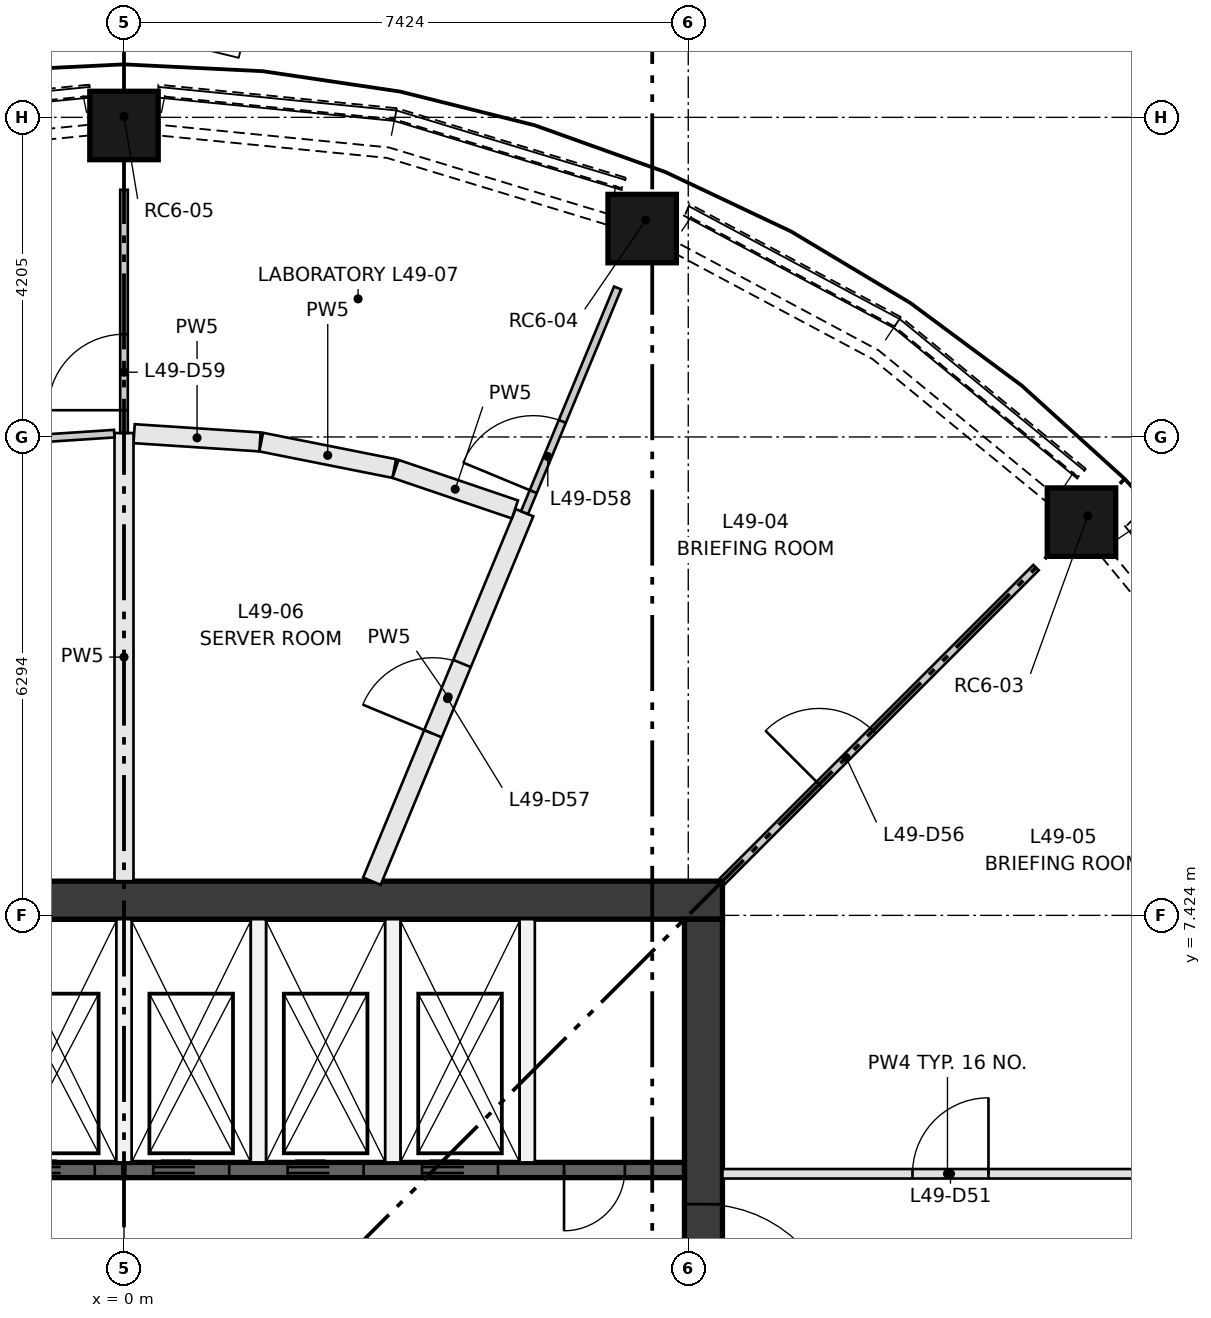
"""IFC4 building model, lengths in metres.
Left out: names, types, materials, properties, quantities, classifications, styles, units other than length and angle.
Written with IfcOpenShell. Run it as: python <this file> out.ifc"""

import sys

from ifc_helpers import new_model, si_unit, direction, frame, frame_2d, origin, origin_2d, place, context, subcontext, project, spatial, polyline, rectangle, outline, extrude, element, fill, save


model = new_model("IFC4")
c1 = context("Model", 3, precision=1e-05, world=origin(), true_north=direction((0.0, 1.0)))
c2 = subcontext(c1, "Body", "Model", "MODEL_VIEW")
j1 = project(units=[si_unit("LENGTHUNIT", "METRE"), si_unit("PLANEANGLEUNIT", "RADIAN")], contexts=[c1])
p1 = place(None, origin())
s1 = spatial("IfcSite", under=j1, at=p1, CompositionType="ELEMENT")
p2 = place(p1, origin())
s2 = spatial("IfcBuilding", under=s1, at=p2, CompositionType="ELEMENT")
p3 = place(p2, frame((0.0, 0.0, 184.3)))
s3 = spatial("IfcBuildingStorey", under=s2, at=p3, CompositionType="ELEMENT", Elevation=184.3)
p4 = place(p3, frame((12.682, 12.682, 0.5), z_axis=(0.0, 0.0, 1.0), x_axis=(0.707106781187, -0.707106781187, 0.0)))
e1 = element("IfcColumn", 1, at=p4, inside=s3, PredefinedType="COLUMN", context=c2, shape_type="SweptSolid", body=[
    extrude(rectangle(XDim=0.9, YDim=0.9, at=origin_2d()), origin(), (0.0, -0.168, 0.986), 2.384),
])
p5 = place(p3, frame((6.863, 16.57, 0.5), z_axis=(0.0, 0.0, 1.0), x_axis=(0.924120904221, -0.382100188932, 0.0)))
e2 = element("IfcColumn", 2, at=p5, inside=s3, PredefinedType="COLUMN", context=c2, shape_type="SweptSolid", body=[
    extrude(rectangle(XDim=0.9, YDim=0.9, at=origin_2d()), origin(), (0.0, -0.168, 0.986), 2.384),
])
p6 = place(p3, frame((0.0, 17.935, 0.5), z_axis=(0.0, 0.0, 1.0), x_axis=(1.0, 0.0, 0.0)))
e3 = element("IfcColumn", 3, at=p6, inside=s3, PredefinedType="COLUMN", context=c2, shape_type="SweptSolid", body=[
    extrude(rectangle(XDim=0.9, YDim=0.9, at=origin_2d()), origin(), (0.0, -0.168, 0.986), 2.384),
])
p7 = place(p3, frame((-7.874, 7.624, 0.0), z_axis=(0.0, 0.0, 1.0), x_axis=(1.0, 0.0, 0.0)))
e4 = element("IfcWall", 4, at=p7, inside=s3, PredefinedType="SHEAR", context=c2, shape_type="SweptSolid", body=[
    extrude(rectangle(XDim=15.748, YDim=0.5, at=frame_2d((7.874, 0.0))), origin(), (0.0, 0.0, 1.0), 3.35),
])
p8 = place(p3, frame((7.624, -7.374, 0.0), z_axis=(0.0, 0.0, 1.0), x_axis=(0.0, 1.0, 0.0)))
e5 = element("IfcWall", 5, at=p8, inside=s3, PredefinedType="SHEAR", context=c2, shape_type="SweptSolid", body=[
    extrude(rectangle(XDim=14.748, YDim=0.5, at=frame_2d((7.374, 0.0))), origin(), (0.0, 0.0, 1.0), 3.35),
])
p9 = place(p8, frame((6.874, 0.0, 0.0)))
e6 = element("IfcOpeningElement", 6, at=p9, cuts=e5, PredefinedType="OPENING", context=c2, shape_type="SweptSolid", body=[
    extrude(rectangle(XDim=1.0, YDim=2.1, at=frame_2d((0.5, 1.05))), frame((0.0, 0.26, 0.0), z_axis=(0.0, -1.0, 0.0), x_axis=(1.0, 0.0, 0.0)), (0.0, 0.0, 1.0), 0.52),
])
p10 = place(p8, frame((3.75, 0.0, 0.0)))
e7 = element("IfcOpeningElement", 7, at=p10, cuts=e5, PredefinedType="OPENING", context=c2, shape_type="SweptSolid", body=[
    extrude(rectangle(XDim=1.8, YDim=2.1, at=frame_2d((0.9, 1.05))), frame((0.0, 0.26, 0.0), z_axis=(0.0, -1.0, 0.0), x_axis=(1.0, 0.0, 0.0)), (0.0, 0.0, 1.0), 0.52),
])
p11 = place(p8, frame((9.198, 0.0, 0.0)))
e8 = element("IfcOpeningElement", 8, at=p11, cuts=e5, PredefinedType="OPENING", context=c2, shape_type="SweptSolid", body=[
    extrude(rectangle(XDim=1.8, YDim=2.1, at=frame_2d((0.9, 1.05))), frame((0.0, 0.26, 0.0), z_axis=(0.0, -1.0, 0.0), x_axis=(1.0, 0.0, 0.0)), (0.0, 0.0, 1.0), 0.52),
])
p12 = place(p3, frame((-7.374, 4.074, 0.0), z_axis=(0.0, 0.0, 1.0), x_axis=(1.0, 0.0, 0.0)))
e9 = element("IfcWall", 9, at=p12, inside=s3, PredefinedType="SHEAR", context=c2, shape_type="SweptSolid", body=[
    extrude(rectangle(XDim=7.374, YDim=0.2, at=frame_2d((3.687, 0.0))), origin(), (0.0, 0.0, 1.0), 3.0),
])
p13 = place(p12, frame((0.684, 0.0, 0.0)))
e10 = element("IfcOpeningElement", 10, at=p13, cuts=e9, PredefinedType="OPENING", context=c2, shape_type="SweptSolid", body=[
    extrude(rectangle(XDim=1.0, YDim=2.1, at=frame_2d((0.5, 1.05))), frame((0.0, 0.11, 0.0), z_axis=(0.0, -1.0, 0.0), x_axis=(1.0, 0.0, 0.0)), (0.0, 0.0, 1.0), 0.22),
])
p14 = place(p12, frame((2.453, 0.0, 0.0)))
e11 = element("IfcOpeningElement", 11, at=p14, cuts=e9, PredefinedType="OPENING", context=c2, shape_type="SweptSolid", body=[
    extrude(rectangle(XDim=1.0, YDim=2.1, at=frame_2d((0.5, 1.05))), frame((0.0, 0.11, 0.0), z_axis=(0.0, -1.0, 0.0), x_axis=(1.0, 0.0, 0.0)), (0.0, 0.0, 1.0), 0.22),
])
p15 = place(p12, frame((4.221, 0.0, 0.0)))
e12 = element("IfcOpeningElement", 12, at=p15, cuts=e9, PredefinedType="OPENING", context=c2, shape_type="SweptSolid", body=[
    extrude(rectangle(XDim=1.0, YDim=2.1, at=frame_2d((0.5, 1.05))), frame((0.0, 0.11, 0.0), z_axis=(0.0, -1.0, 0.0), x_axis=(1.0, 0.0, 0.0)), (0.0, 0.0, 1.0), 0.22),
])
p16 = place(p12, frame((5.99, 0.0, 0.0)))
e13 = element("IfcOpeningElement", 13, at=p16, cuts=e9, PredefinedType="OPENING", context=c2, shape_type="SweptSolid", body=[
    extrude(rectangle(XDim=1.0, YDim=2.1, at=frame_2d((0.5, 1.05))), frame((0.0, 0.11, 0.0), z_axis=(0.0, -1.0, 0.0), x_axis=(1.0, 0.0, 0.0)), (0.0, 0.0, 1.0), 0.22),
])
p17 = place(p3, frame((0.0, 4.074, 0.0), z_axis=(0.0, 0.0, 1.0), x_axis=(1.0, 0.0, 0.0)))
e14 = element("IfcWall", 14, at=p17, inside=s3, PredefinedType="SHEAR", context=c2, shape_type="SweptSolid", body=[
    extrude(rectangle(XDim=7.374, YDim=0.2, at=frame_2d((3.687, 0.0))), origin(), (0.0, 0.0, 1.0), 3.0),
])
p18 = place(p17, frame((0.384, 0.0, 0.0)))
e15 = element("IfcOpeningElement", 15, at=p18, cuts=e14, PredefinedType="OPENING", context=c2, shape_type="SweptSolid", body=[
    extrude(rectangle(XDim=1.0, YDim=2.1, at=frame_2d((0.5, 1.05))), frame((0.0, 0.11, 0.0), z_axis=(0.0, -1.0, 0.0), x_axis=(1.0, 0.0, 0.0)), (0.0, 0.0, 1.0), 0.22),
])
p19 = place(p17, frame((2.153, 0.0, 0.0)))
e16 = element("IfcOpeningElement", 16, at=p19, cuts=e14, PredefinedType="OPENING", context=c2, shape_type="SweptSolid", body=[
    extrude(rectangle(XDim=1.0, YDim=2.1, at=frame_2d((0.5, 1.05))), frame((0.0, 0.11, 0.0), z_axis=(0.0, -1.0, 0.0), x_axis=(1.0, 0.0, 0.0)), (0.0, 0.0, 1.0), 0.22),
])
p20 = place(p17, frame((3.921, 0.0, 0.0)))
e17 = element("IfcOpeningElement", 17, at=p20, cuts=e14, PredefinedType="OPENING", context=c2, shape_type="SweptSolid", body=[
    extrude(rectangle(XDim=1.0, YDim=2.1, at=frame_2d((0.5, 1.05))), frame((0.0, 0.11, 0.0), z_axis=(0.0, -1.0, 0.0), x_axis=(1.0, 0.0, 0.0)), (0.0, 0.0, 1.0), 0.22),
])
p21 = place(p17, frame((5.79, 0.0, 0.0)))
e18 = element("IfcOpeningElement", 18, at=p21, cuts=e14, PredefinedType="OPENING", context=c2, shape_type="SweptSolid", body=[
    extrude(rectangle(XDim=0.8, YDim=2.1, at=frame_2d((0.4, 1.05))), frame((0.0, 0.11, 0.0), z_axis=(0.0, -1.0, 0.0), x_axis=(1.0, 0.0, 0.0)), (0.0, 0.0, 1.0), 0.22),
])
for number, where, z_axis, x_axis in (
    (19, (0.0, 4.174, 0.0), (0.0, 0.0, 1.0), (0.0, 1.0, 0.0)),
    (20, (1.769, 4.174, 0.0), (0.0, 0.0, 1.0), (0.0, 1.0, 0.0)),
    (21, (3.537, 4.174, 0.0), (0.0, 0.0, 1.0), (0.0, 1.0, 0.0)),
    (22, (5.305, 4.174, 0.0), (0.0, 0.0, 1.0), (0.0, 1.0, 0.0)),
):
    element("IfcWall", number, at=place(p3, frame(where, z_axis=z_axis, x_axis=x_axis)), inside=s3, PredefinedType="PARTITIONING", context=c2, shape_type="SweptSolid", body=[
        extrude(rectangle(XDim=3.2, YDim=0.2, at=frame_2d((1.6, 0.0))), origin(), (0.0, 0.0, 1.0), 3.0),
    ])
p22 = place(p3, frame((15.296, 10.221, 0.0), z_axis=(0.762829436571, 0.625791219471, 0.162716318582), x_axis=(-0.634244680745, 0.773132385109, 6.479811e-06)))
e23 = element("IfcWall", 23, at=p22, inside=s3, PredefinedType="SOLIDWALL", context=c2, shape_type="SweptSolid", body=[
    extrude(outline(polyline([(0.0, 0.0), (3.151, 0.0), (3.137, 0.912), (0.014, 0.912), (0.0, 0.0)])), origin(), (0.0, 0.0, -1.0), 0.3),
])
p23 = place(p3, frame((12.657, 13.297, 0.0), z_axis=(0.625801401555, 0.762803450932, 0.162798959018), x_axis=(-0.773117144297, 0.634263258583, -2.518315e-06)))
e24 = element("IfcWall", 24, at=p23, inside=s3, PredefinedType="SOLIDWALL", context=c2, shape_type="SweptSolid", body=[
    extrude(outline(polyline([(0.0, 0.0), (3.151, 5.551e-17), (3.137, 0.912), (0.015, 0.912), (0.0, 0.0)])), origin(), (0.0, 0.0, -1.0), 0.3),
])
p24 = place(p3, frame((10.221, 15.296, 0.0), z_axis=(0.465338838382, 0.870053087177, 0.162688017342), x_axis=(-0.881801348468, 0.471621015005, 6.731272e-06)))
e25 = element("IfcWall", 25, at=p24, inside=s3, PredefinedType="SOLIDWALL", context=c2, shape_type="SweptSolid", body=[
    extrude(outline(polyline([(0.0, 0.0), (3.152, -2.776e-17), (3.137, 0.912), (0.015, 0.912), (0.0, 0.0)])), origin(), (0.0, 0.0, -1.0), 0.3),
])
p25 = place(p3, frame((6.605, 17.128, 0.0), z_axis=(0.286447724297, 0.94416395345, 0.162794748846), x_axis=(-0.956929514391, 0.290320348038, 1.683956e-06)))
e26 = element("IfcWall", 26, at=p25, inside=s3, PredefinedType="SOLIDWALL", context=c2, shape_type="SweptSolid", body=[
    extrude(outline(polyline([(0.0, 0.0), (3.151, 0.0), (3.137, 0.912), (0.014, 0.912), (0.0, 0.0)])), origin(), (0.0, 0.0, -1.0), 0.3),
])
p26 = place(p3, frame((3.59, 18.043, 0.0), z_axis=(0.097001095349, 0.981910573414, 0.162611233681), x_axis=(-0.995155966643, 0.098308707783, 5.283619e-06)))
e27 = element("IfcWall", 27, at=p26, inside=s3, PredefinedType="SOLIDWALL", context=c2, shape_type="SweptSolid", body=[
    extrude(outline(polyline([(0.0, 0.0), (3.152, 0.0), (3.138, 0.912), (0.015, 0.912), (0.0, 0.0)])), origin(), (0.0, 0.0, -1.0), 0.3),
])
p27 = place(p3, frame((-0.452, 18.353, 0.0), z_axis=(-0.096960979381, 0.981893053275, 0.162740899619), x_axis=(-0.995159671342, -0.098271198901, 9.28862e-07)))
e28 = element("IfcWall", 28, at=p27, inside=s3, PredefinedType="SOLIDWALL", context=c2, shape_type="SweptSolid", body=[
    extrude(outline(polyline([(0.0, 0.0), (3.152, 1.388e-17), (3.138, 0.912), (0.015, 0.912), (0.0, 0.0)])), origin(), (0.0, 0.0, -1.0), 0.3),
])
p28 = place(p3, frame((7.874, 4.024, 0.0), z_axis=(0.0, 0.0, 1.0), x_axis=(1.0, 0.0, 0.0)))
e29 = element("IfcWall", 29, at=p28, inside=s3, PredefinedType="PARTITIONING", context=c2, shape_type="SweptSolid", body=[
    extrude(rectangle(XDim=5.921, YDim=0.125, at=frame_2d((2.96, 0.0))), origin(), (0.0, 0.0, 1.0), 3.0),
])
p29 = place(p28, frame((2.5, 0.0, 0.0)))
e30 = element("IfcOpeningElement", 30, at=p29, cuts=e29, PredefinedType="OPENING", context=c2, shape_type="SweptSolid", body=[
    extrude(rectangle(XDim=1.0, YDim=2.1, at=frame_2d((0.5, 1.05))), frame((0.0, 0.073, 0.0), z_axis=(0.0, -1.0, 0.0), x_axis=(1.0, 0.0, 0.0)), (0.0, 0.0, 1.0), 0.145),
])
p30 = place(p3, frame((7.874, 7.874, 0.0), z_axis=(0.0, 0.0, 1.0), x_axis=(0.707106781187, 0.707106781187, 0.0)))
e31 = element("IfcWall", 31, at=p30, inside=s3, PredefinedType="PARTITIONING", context=c2, shape_type="SweptSolid", body=[
    extrude(rectangle(XDim=5.834, YDim=0.1, at=frame_2d((2.917, 0.0))), origin(), (0.0, 0.0, 1.0), 3.0),
])
p31 = place(p30, frame((1.8, 0.0, 0.0)))
e32 = element("IfcOpeningElement", 32, at=p31, cuts=e31, PredefinedType="OPENING", context=c2, shape_type="SweptSolid", body=[
    extrude(rectangle(XDim=1.0, YDim=2.1, at=frame_2d((0.5, 1.05))), frame((0.0, 0.06, 0.0), z_axis=(0.0, -1.0, 0.0), x_axis=(1.0, 0.0, 0.0)), (0.0, 0.0, 1.0), 0.12),
])
p32 = place(p3, frame((3.261, 7.874, 0.0), z_axis=(0.0, 0.0, 1.0), x_axis=(0.382698345407, 0.923873355186, 0.0)))
e33 = element("IfcWall", 33, at=p32, inside=s3, PredefinedType="PARTITIONING", context=c2, shape_type="SweptSolid", body=[
    extrude(rectangle(XDim=5.247, YDim=0.25, at=frame_2d((2.624, 0.0))), origin(), (0.0, 0.0, 1.0), 3.0),
])
p33 = place(p32, frame((2.1, 0.0, 0.0)))
e34 = element("IfcOpeningElement", 34, at=p33, cuts=e33, PredefinedType="OPENING", context=c2, shape_type="SweptSolid", body=[
    extrude(rectangle(XDim=1.0, YDim=2.1, at=frame_2d((0.5, 1.05))), frame((0.0, 0.135, 0.0), z_axis=(0.0, -1.0, 0.0), x_axis=(1.0, 0.0, 0.0)), (0.0, 0.0, 1.0), 0.27),
])
p34 = place(p3, frame((5.27, 12.722, 0.0), z_axis=(0.0, 0.0, 1.0), x_axis=(0.382675211785, 0.923882937544, 0.0)))
e35 = element("IfcWall", 35, at=p34, inside=s3, PredefinedType="PARTITIONING", context=c2, shape_type="SweptSolid", body=[
    extrude(rectangle(XDim=3.2, YDim=0.1, at=frame_2d((1.6, 0.0))), origin(), (0.0, 0.0, 1.0), 3.0),
])
p35 = place(p34, frame((0.3, 0.0, 0.0)))
e36 = element("IfcOpeningElement", 36, at=p35, cuts=e35, PredefinedType="OPENING", context=c2, shape_type="SweptSolid", body=[
    extrude(rectangle(XDim=1.0, YDim=2.1, at=frame_2d((0.5, 1.05))), frame((0.0, 0.06, 0.0), z_axis=(0.0, -1.0, 0.0), x_axis=(1.0, 0.0, 0.0)), (0.0, 0.0, 1.0), 0.12),
])
p36 = place(p3, frame((0.133, 13.761, 0.0), z_axis=(0.0, 0.0, 1.0), x_axis=(0.997854270927, -0.065474071153, 0.0)))
e37 = element("IfcWall", 37, at=p36, inside=s3, PredefinedType="PARTITIONING", context=c2, shape_type="SweptSolid", body=[
    extrude(rectangle(XDim=1.659, YDim=0.25, at=frame_2d((0.83, 0.0))), origin(), (0.0, 0.0, 1.0), 3.0),
])
p37 = place(p3, frame((1.805, 13.651, 0.0), z_axis=(0.0, 0.0, 1.0), x_axis=(0.980790558622, -0.195063784741, 0.0)))
e38 = element("IfcWall", 38, at=p37, inside=s3, PredefinedType="PARTITIONING", context=c2, shape_type="SweptSolid", body=[
    extrude(rectangle(XDim=1.785, YDim=0.25, at=frame_2d((0.892, 0.0))), origin(), (0.0, 0.0, 1.0), 3.0),
])
p38 = place(p3, frame((3.572, 13.298, 0.0), z_axis=(0.0, 0.0, 1.0), x_axis=(0.946933132378, -0.32143061896, 0.0)))
e39 = element("IfcWall", 39, at=p38, inside=s3, PredefinedType="PARTITIONING", context=c2, shape_type="SweptSolid", body=[
    extrude(rectangle(XDim=1.66, YDim=0.25, at=frame_2d((0.83, 0.0))), origin(), (0.0, 0.0, 1.0), 3.0),
])
p39 = place(p3, frame((0.0, 7.874, 0.0), z_axis=(0.0, 0.0, 1.0), x_axis=(0.0, 1.0, 0.0)))
e40 = element("IfcWall", 40, at=p39, inside=s3, PredefinedType="PARTITIONING", context=c2, shape_type="SweptSolid", body=[
    extrude(rectangle(XDim=5.896, YDim=0.25, at=frame_2d((2.948, 0.0))), origin(), (0.0, 0.0, 1.0), 3.0),
])
p40 = place(p3, frame((0.0, 13.77, 0.0), z_axis=(0.0, 0.0, 1.0), x_axis=(0.0, 1.0, 0.0)))
e41 = element("IfcWall", 41, at=p40, inside=s3, PredefinedType="PARTITIONING", context=c2, shape_type="SweptSolid", body=[
    extrude(rectangle(XDim=3.2, YDim=0.1, at=frame_2d((1.6, 0.0))), origin(), (0.0, 0.0, 1.0), 3.0),
])
p41 = place(p40, frame((0.3, 0.0, 0.0)))
e42 = element("IfcOpeningElement", 42, at=p41, cuts=e41, PredefinedType="OPENING", context=c2, shape_type="SweptSolid", body=[
    extrude(rectangle(XDim=1.0, YDim=2.1, at=frame_2d((0.5, 1.05))), frame((0.0, 0.06, 0.0), z_axis=(0.0, -1.0, 0.0), x_axis=(1.0, 0.0, 0.0)), (0.0, 0.0, 1.0), 0.12),
])
p42 = place(p3, frame((-1.794, 13.652, 0.0), z_axis=(0.0, 0.0, 1.0), x_axis=(0.997850681937, 0.065528746043, 0.0)))
e43 = element("IfcWall", 43, at=p42, inside=s3, PredefinedType="PARTITIONING", context=c2, shape_type="SweptSolid", body=[
    extrude(rectangle(XDim=1.669, YDim=0.1, at=frame_2d((0.834, 0.0))), origin(), (0.0, 0.0, 1.0), 3.0),
])
p43 = place(p16, frame((1.0, 0.0, 0.0), z_axis=(0.0, 0.0, 1.0), x_axis=(-1.0, 0.0, 0.0)))
e44 = element("IfcDoor", 44, at=p43, inside=s3, OperationType="DOUBLE_DOOR_SLIDING", PredefinedType="DOOR", context=c2, shape_type="SweptSolid", body=[
    extrude(rectangle(XDim=1.0, YDim=2.1, at=frame_2d((0.5, 1.05))), frame((0.0, 0.025, 0.0), z_axis=(0.0, -1.0, 0.0), x_axis=(1.0, 0.0, 0.0)), (0.0, 0.0, 1.0), 0.05),
])
fill(e13, e44)
p44 = place(p18, frame((1.0, 0.0, 0.0), z_axis=(0.0, 0.0, 1.0), x_axis=(-1.0, 0.0, 0.0)))
e45 = element("IfcDoor", 45, at=p44, inside=s3, OperationType="DOUBLE_DOOR_SLIDING", PredefinedType="DOOR", context=c2, shape_type="SweptSolid", body=[
    extrude(rectangle(XDim=1.0, YDim=2.1, at=frame_2d((0.5, 1.05))), frame((0.0, 0.025, 0.0), z_axis=(0.0, -1.0, 0.0), x_axis=(1.0, 0.0, 0.0)), (0.0, 0.0, 1.0), 0.05),
])
fill(e15, e45)
p45 = place(p19, frame((1.0, 0.0, 0.0), z_axis=(0.0, 0.0, 1.0), x_axis=(-1.0, 0.0, 0.0)))
e46 = element("IfcDoor", 46, at=p45, inside=s3, OperationType="DOUBLE_DOOR_SLIDING", PredefinedType="DOOR", context=c2, shape_type="SweptSolid", body=[
    extrude(rectangle(XDim=1.0, YDim=2.1, at=frame_2d((0.5, 1.05))), frame((0.0, 0.025, 0.0), z_axis=(0.0, -1.0, 0.0), x_axis=(1.0, 0.0, 0.0)), (0.0, 0.0, 1.0), 0.05),
])
fill(e16, e46)
p46 = place(p20, frame((1.0, 0.0, 0.0), z_axis=(0.0, 0.0, 1.0), x_axis=(-1.0, 0.0, 0.0)))
e47 = element("IfcDoor", 47, at=p46, inside=s3, OperationType="DOUBLE_DOOR_SLIDING", PredefinedType="DOOR", context=c2, shape_type="SweptSolid", body=[
    extrude(rectangle(XDim=1.0, YDim=2.1, at=frame_2d((0.5, 1.05))), frame((0.0, 0.025, 0.0), z_axis=(0.0, -1.0, 0.0), x_axis=(1.0, 0.0, 0.0)), (0.0, 0.0, 1.0), 0.05),
])
fill(e17, e47)
p47 = place(p21, frame((0.8, 0.0, 0.0), z_axis=(0.0, 0.0, 1.0), x_axis=(-1.0, 0.0, 0.0)))
e48 = element("IfcDoor", 48, at=p47, inside=s3, OperationType="SINGLE_SWING_LEFT", PredefinedType="DOOR", context=c2, shape_type="SweptSolid", body=[
    extrude(rectangle(XDim=0.8, YDim=2.1, at=frame_2d((0.4, 1.05))), frame((0.0, 0.025, 0.0), z_axis=(0.0, -1.0, 0.0), x_axis=(1.0, 0.0, 0.0)), (0.0, 0.0, 1.0), 0.05),
])
fill(e18, e48)
p48 = place(p11, frame((1.8, 0.0, 0.0), z_axis=(0.0, 0.0, 1.0), x_axis=(-1.0, 0.0, 0.0)))
e49 = element("IfcDoor", 49, at=p48, inside=s3, OperationType="DOUBLE_DOOR_SINGLE_SWING", PredefinedType="DOOR", context=c2, shape_type="SweptSolid", body=[
    extrude(rectangle(XDim=1.8, YDim=2.1, at=frame_2d((0.9, 1.05))), frame((0.0, 0.025, 0.0), z_axis=(0.0, -1.0, 0.0), x_axis=(1.0, 0.0, 0.0)), (0.0, 0.0, 1.0), 0.05),
])
fill(e8, e49)
p49 = place(p29, origin())
e50 = element("IfcDoor", 50, at=p49, inside=s3, OperationType="SINGLE_SWING_RIGHT", PredefinedType="DOOR", context=c2, shape_type="SweptSolid", body=[
    extrude(rectangle(XDim=1.0, YDim=2.1, at=frame_2d((0.5, 1.05))), frame((0.0, 0.025, 0.0), z_axis=(0.0, -1.0, 0.0), x_axis=(1.0, 0.0, 0.0)), (0.0, 0.0, 1.0), 0.05),
])
fill(e30, e50)
p50 = place(p31, origin())
e51 = element("IfcDoor", 51, at=p50, inside=s3, OperationType="SINGLE_SWING_LEFT", PredefinedType="DOOR", context=c2, shape_type="SweptSolid", body=[
    extrude(rectangle(XDim=1.0, YDim=2.1, at=frame_2d((0.5, 1.05))), frame((0.0, 0.025, 0.0), z_axis=(0.0, -1.0, 0.0), x_axis=(1.0, 0.0, 0.0)), (0.0, 0.0, 1.0), 0.05),
])
fill(e32, e51)
p51 = place(p33, origin())
e52 = element("IfcDoor", 52, at=p51, inside=s3, OperationType="SINGLE_SWING_LEFT", PredefinedType="DOOR", context=c2, shape_type="SweptSolid", body=[
    extrude(rectangle(XDim=1.0, YDim=2.1, at=frame_2d((0.5, 1.05))), frame((0.0, 0.025, 0.0), z_axis=(0.0, -1.0, 0.0), x_axis=(1.0, 0.0, 0.0)), (0.0, 0.0, 1.0), 0.05),
])
fill(e34, e52)
p52 = place(p35, origin())
e53 = element("IfcDoor", 53, at=p52, inside=s3, OperationType="SINGLE_SWING_LEFT", PredefinedType="DOOR", context=c2, shape_type="SweptSolid", body=[
    extrude(rectangle(XDim=1.0, YDim=2.1, at=frame_2d((0.5, 1.05))), frame((0.0, 0.025, 0.0), z_axis=(0.0, -1.0, 0.0), x_axis=(1.0, 0.0, 0.0)), (0.0, 0.0, 1.0), 0.05),
])
fill(e36, e53)
p53 = place(p41, origin())
e54 = element("IfcDoor", 54, at=p53, inside=s3, OperationType="SINGLE_SWING_LEFT", PredefinedType="DOOR", context=c2, shape_type="SweptSolid", body=[
    extrude(rectangle(XDim=1.0, YDim=2.1, at=frame_2d((0.5, 1.05))), frame((0.0, 0.025, 0.0), z_axis=(0.0, -1.0, 0.0), x_axis=(1.0, 0.0, 0.0)), (0.0, 0.0, 1.0), 0.05),
])
fill(e42, e54)
save(model, sys.argv[1])
